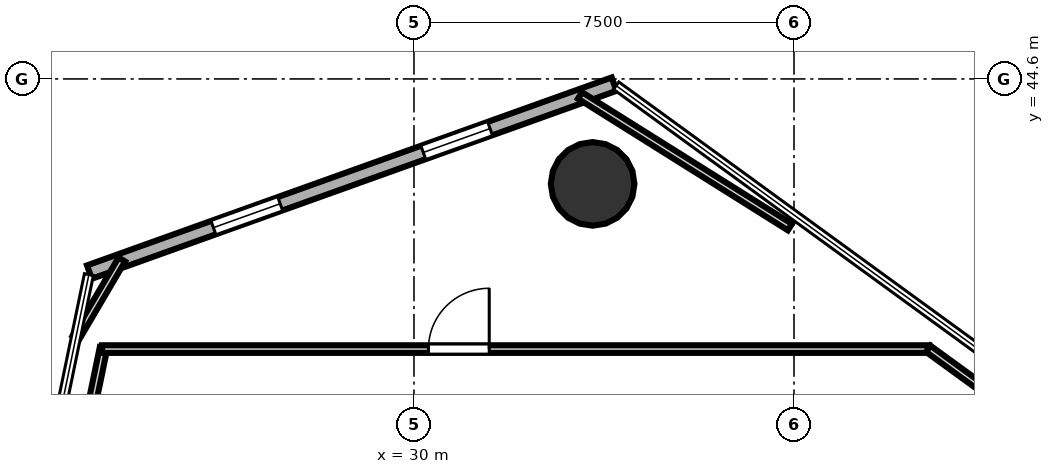
"""IFC4 building model, lengths in metres.
Left out: names, types, materials, properties, quantities, classifications, styles, units other than length and angle.
Written with IfcOpenShell. Run it as: python <this file> out.ifc"""

import sys

from ifc_helpers import new_model, si_unit, direction, frame, frame_2d, origin, origin_2d, place, context, subcontext, project, spatial, rectangle, hollow_circle, extrude, element, fill, save


model = new_model("IFC4")
c1 = context("Model", 3, precision=1e-05, world=origin(), true_north=direction((0.0, 1.0)))
c2 = subcontext(c1, "Body", "Model", "MODEL_VIEW")
j1 = project(units=[si_unit("LENGTHUNIT", "METRE"), si_unit("PLANEANGLEUNIT", "RADIAN")], contexts=[c1])
p1 = place(None, origin())
s1 = spatial("IfcSite", under=j1, at=p1, CompositionType="ELEMENT")
p2 = place(p1, origin())
s2 = spatial("IfcBuilding", under=s1, at=p2, CompositionType="ELEMENT")
p3 = place(p2, frame((0.0, 0.0, 93.2)))
s3 = spatial("IfcBuildingStorey", under=s2, at=p3, CompositionType="ELEMENT", Elevation=93.2)
p4 = place(p3, frame((33.526, 42.529, 0.0), z_axis=(0.0, 0.0, 1.0), x_axis=(1.0, 0.0, 0.0)))
e1 = element("IfcColumn", 1, at=p4, inside=s3, PredefinedType="COLUMN", context=c2, shape_type="SweptSolid", body=[
    extrude(hollow_circle(Radius=0.825, WallThickness=0.04, at=origin_2d()), origin(), (0.0, 0.0, 1.0), 4.6),
])
p5 = place(p3, frame((33.949, 44.497, 0.0), z_axis=(0.0, 0.0, 1.0), x_axis=(-0.941433163769, -0.337199641394, 0.0)))
e2 = element("IfcWall", 2, at=p5, inside=s3, PredefinedType="SOLIDWALL", context=c2, shape_type="SweptSolid", body=[
    extrude(rectangle(XDim=10.999, YDim=0.28, at=frame_2d((5.499, 0.0))), origin(), (0.0, 0.0, 1.0), 4.42),
])
p6 = place(p5, frame((2.6, 0.0, 1.0)))
e3 = element("IfcOpeningElement", 3, at=p6, cuts=e2, PredefinedType="OPENING", context=c2, shape_type="SweptSolid", body=[
    extrude(rectangle(XDim=1.4, YDim=1.5, at=frame_2d((0.7, 0.75))), frame((0.0, 0.15, 0.0), z_axis=(0.0, -1.0, 0.0), x_axis=(1.0, 0.0, 0.0)), (0.0, 0.0, 1.0), 0.3),
])
p7 = place(p5, frame((6.999, 0.0, 1.0)))
e4 = element("IfcOpeningElement", 4, at=p7, cuts=e2, PredefinedType="OPENING", context=c2, shape_type="SweptSolid", body=[
    extrude(rectangle(XDim=1.4, YDim=1.5, at=frame_2d((0.7, 0.75))), frame((0.0, 0.15, 0.0), z_axis=(0.0, -1.0, 0.0), x_axis=(1.0, 0.0, 0.0)), (0.0, 0.0, 1.0), 0.3),
])
p8 = place(p3, frame((23.23, 36.182, 0.0), z_axis=(0.0, 0.0, 1.0), x_axis=(0.202407399899, 0.979301406343, 0.0)))
e5 = element("IfcWall", 5, at=p8, inside=s3, PredefinedType="PARTITIONING", context=c2, shape_type="SweptSolid", body=[
    extrude(rectangle(XDim=3.177, YDim=0.15, at=frame_2d((1.588, 0.0))), origin(), (0.0, 0.0, 1.0), 2.94),
])
p9 = place(p3, frame((23.843, 39.269, 0.0), z_axis=(0.0, 0.0, 1.0), x_axis=(1.0, 0.0, 0.0)))
e6 = element("IfcWall", 6, at=p9, inside=s3, PredefinedType="PARTITIONING", context=c2, shape_type="SweptSolid", body=[
    extrude(rectangle(XDim=16.324, YDim=0.15, at=frame_2d((8.162, 0.0))), origin(), (0.0, 0.0, 1.0), 2.94),
])
p10 = place(p9, frame((6.442, 0.0, 0.0)))
e7 = element("IfcOpeningElement", 7, at=p10, cuts=e6, PredefinedType="OPENING", context=c2, shape_type="SweptSolid", body=[
    extrude(rectangle(XDim=1.2, YDim=2.15, at=frame_2d((0.6, 1.075))), frame((0.0, 0.085, 0.0), z_axis=(0.0, -1.0, 0.0), x_axis=(1.0, 0.0, 0.0)), (0.0, 0.0, 1.0), 0.17),
])
p11 = place(p3, frame((40.149, 39.275, 0.0), z_axis=(0.0, 0.0, 1.0), x_axis=(0.808678485234, -0.588250888243, 0.0)))
e8 = element("IfcWall", 8, at=p11, inside=s3, PredefinedType="PARTITIONING", context=c2, shape_type="SweptSolid", body=[
    extrude(rectangle(XDim=4.399, YDim=0.15, at=frame_2d((2.2, 0.0))), origin(), (0.0, 0.0, 1.0), 2.94),
])
p12 = place(p3, frame((23.326, 39.49, 0.0), z_axis=(0.0, 0.0, 1.0), x_axis=(0.506460438257, 0.862263199076, 0.0)))
e9 = element("IfcWall", 9, at=p12, inside=s3, PredefinedType="PARTITIONING", context=c2, shape_type="SweptSolid", body=[
    extrude(rectangle(XDim=1.792, YDim=0.15, at=frame_2d((0.896, 0.0))), origin(), (0.0, 0.0, 1.0), 2.94),
])
p13 = place(p3, frame((33.277, 44.274, 0.0), z_axis=(0.0, 0.0, 1.0), x_axis=(0.847167011218, -0.531326693386, 0.0)))
e10 = element("IfcWall", 10, at=p13, inside=s3, PredefinedType="PARTITIONING", context=c2, shape_type="SweptSolid", body=[
    extrude(rectangle(XDim=4.89, YDim=0.15, at=frame_2d((2.445, 0.0))), origin(), (0.0, 0.0, 1.0), 2.94),
])
p14 = place(p10, origin())
e11 = element("IfcDoor", 11, at=p14, inside=s3, OperationType="SINGLE_SWING_RIGHT", PredefinedType="DOOR", context=c2, shape_type="SweptSolid", body=[
    extrude(rectangle(XDim=1.2, YDim=2.15, at=frame_2d((0.6, 1.075))), frame((0.0, 0.025, 0.0), z_axis=(0.0, -1.0, 0.0), x_axis=(1.0, 0.0, 0.0)), (0.0, 0.0, 1.0), 0.05),
])
fill(e7, e11)
p15 = place(p6, origin())
e12 = element("IfcWindow", 12, at=p15, inside=s3, PartitioningType="SINGLE_PANEL", PredefinedType="WINDOW", context=c2, shape_type="SweptSolid", body=[
    extrude(rectangle(XDim=1.4, YDim=1.5, at=frame_2d((0.7, 0.75))), frame((0.0, 0.03, 0.0), z_axis=(0.0, -1.0, 0.0), x_axis=(1.0, 0.0, 0.0)), (0.0, 0.0, 1.0), 0.06),
])
fill(e3, e12)
p16 = place(p7, origin())
e13 = element("IfcWindow", 13, at=p16, inside=s3, PartitioningType="SINGLE_PANEL", PredefinedType="WINDOW", context=c2, shape_type="SweptSolid", body=[
    extrude(rectangle(XDim=1.4, YDim=1.5, at=frame_2d((0.7, 0.75))), frame((0.0, 0.03, 0.0), z_axis=(0.0, -1.0, 0.0), x_axis=(1.0, 0.0, 0.0)), (0.0, 0.0, 1.0), 0.06),
])
fill(e4, e13)
save(model, sys.argv[1])
